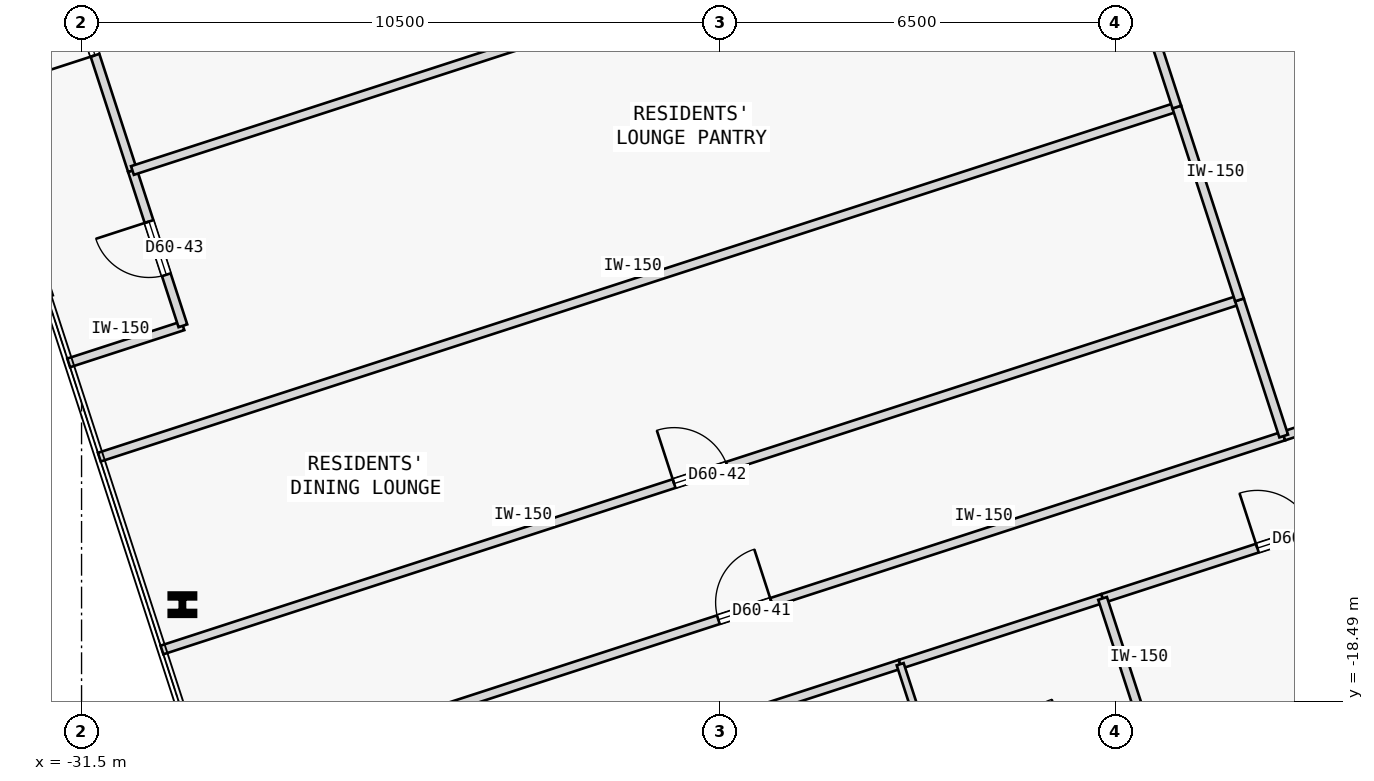
"""IFC4 building model, lengths in metres.
Left out: names, types, materials, properties, quantities, classifications, styles, units other than length and angle.
Written with IfcOpenShell. Run it as: python <this file> out.ifc"""

import sys

from ifc_helpers import new_model, si_unit, direction, frame, frame_2d, origin, origin_2d, place, context, subcontext, project, spatial, rectangle, i_section, extrude, element, fill, save


model = new_model("IFC4")
c1 = context("Model", 3, precision=1e-05, world=origin(), true_north=direction((0.0, 1.0)))
c2 = subcontext(c1, "Body", "Model", "MODEL_VIEW")
j1 = project(units=[si_unit("LENGTHUNIT", "METRE"), si_unit("PLANEANGLEUNIT", "RADIAN")], contexts=[c1])
p1 = place(None, origin())
s1 = spatial("IfcSite", under=j1, at=p1, CompositionType="ELEMENT")
p2 = place(p1, origin())
s2 = spatial("IfcBuilding", under=s1, at=p2, CompositionType="ELEMENT")
p3 = place(p2, frame((0.0, 0.0, 227.65)))
s3 = spatial("IfcBuildingStorey", under=s2, at=p3, CompositionType="ELEMENT", Elevation=227.65)
p4 = place(p3, frame((-29.842, -16.897, 0.0), z_axis=(0.0, 0.0, 1.0), x_axis=(1.0, 0.0, 0.0)))
e1 = element("IfcColumn", 1, at=p4, inside=s3, PredefinedType="COLUMN", context=c2, shape_type="SweptSolid", body=[
    extrude(i_section(OverallWidth=0.405, OverallDepth=0.355, WebThickness=0.042, FlangeThickness=0.068, FilletRadius=0.015, at=origin_2d()), origin(), (0.0, 0.0, 1.0), 3.35),
])
p5 = place(p3, frame((-14.709, -16.794, 0.0), z_axis=(0.0, 0.0, 1.0), x_axis=(0.951050295235, 0.309036140172, 0.0)))
e2 = element("IfcWall", 2, at=p5, inside=s3, PredefinedType="PARTITIONING", context=c2, shape_type="SweptSolid", body=[
    extrude(rectangle(XDim=6.302, YDim=0.15, at=frame_2d((3.151, 0.0))), origin(), (0.0, 0.0, 1.0), 3.125),
])
p6 = place(p5, frame((2.676, 0.0, 0.0)))
e3 = element("IfcOpeningElement", 3, at=p6, cuts=e2, PredefinedType="OPENING", context=c2, shape_type="SweptSolid", body=[
    extrude(rectangle(XDim=0.95, YDim=2.15, at=frame_2d((0.475, 1.075))), frame((0.0, 0.085, 0.0), z_axis=(0.0, -1.0, 0.0), x_axis=(1.0, 0.0, 0.0)), (0.0, 0.0, 1.0), 0.17),
])
p7 = place(p3, frame((-22.175, -19.22, 0.0), z_axis=(0.0, 0.0, 1.0), x_axis=(0.951052627573, 0.309028962374, 0.0)))
e4 = element("IfcWall", 4, at=p7, inside=s3, PredefinedType="PARTITIONING", context=c2, shape_type="SweptSolid", body=[
    extrude(rectangle(XDim=4.35, YDim=0.15, at=frame_2d((2.175, 0.0))), origin(), (0.0, 0.0, 1.0), 3.125),
])
p8 = place(p3, frame((-18.038, -17.876, 0.0), z_axis=(0.0, 0.0, 1.0), x_axis=(0.951062257173, 0.308999325213, 0.0)))
e5 = element("IfcWall", 5, at=p8, inside=s3, PredefinedType="PARTITIONING", context=c2, shape_type="SweptSolid", body=[
    extrude(rectangle(XDim=3.5, YDim=0.15, at=frame_2d((1.75, 0.0))), origin(), (0.0, 0.0, 1.0), 3.125),
])
p9 = place(p3, frame((-29.45, -19.881, 0.0), z_axis=(0.0, 0.0, 1.0), x_axis=(0.95105650271, 0.309017036186, 0.0)))
e6 = element("IfcWall", 6, at=p9, inside=s3, PredefinedType="PARTITIONING", context=c2, shape_type="SweptSolid", body=[
    extrude(rectangle(XDim=18.632, YDim=0.15, at=frame_2d((9.316, 0.0))), origin(), (0.0, 0.0, 1.0), 3.125),
])
p10 = place(p9, frame((8.856, 0.0, 0.0)))
e7 = element("IfcOpeningElement", 7, at=p10, cuts=e6, PredefinedType="OPENING", context=c2, shape_type="SweptSolid", body=[
    extrude(rectangle(XDim=0.92, YDim=2.15, at=frame_2d((0.46, 1.075))), frame((0.0, 0.085, 0.0), z_axis=(0.0, -1.0, 0.0), x_axis=(1.0, 0.0, 0.0)), (0.0, 0.0, 1.0), 0.17),
])
p11 = place(p3, frame((-31.712, -12.921, 0.0), z_axis=(0.0, 0.0, 1.0), x_axis=(0.951054051148, 0.309024581215, 0.0)))
e8 = element("IfcWall", 8, at=p11, inside=s3, PredefinedType="PARTITIONING", context=c2, shape_type="SweptSolid", body=[
    extrude(rectangle(XDim=1.975, YDim=0.15, at=frame_2d((0.988, 0.0))), origin(), (0.0, 0.0, 1.0), 3.125),
])
p12 = place(p3, frame((-29.833, -12.311, 0.0), z_axis=(0.0, 0.0, 1.0), x_axis=(-0.309044953986, 0.951047431213, 0.0)))
e9 = element("IfcWall", 9, at=p12, inside=s3, PredefinedType="PARTITIONING", context=c2, shape_type="SweptSolid", body=[
    extrude(rectangle(XDim=2.685, YDim=0.15, at=frame_2d((1.343, 0.0))), origin(), (0.0, 0.0, 1.0), 3.125),
])
p13 = place(p12, frame((0.883, 0.0, 0.0)))
e10 = element("IfcOpeningElement", 10, at=p13, cuts=e9, PredefinedType="OPENING", context=c2, shape_type="SweptSolid", body=[
    extrude(rectangle(XDim=0.92, YDim=2.15, at=frame_2d((0.46, 1.075))), frame((0.0, 0.085, 0.0), z_axis=(0.0, -1.0, 0.0), x_axis=(1.0, 0.0, 0.0)), (0.0, 0.0, 1.0), 0.17),
])
p14 = place(p3, frame((-30.663, -9.757, 0.0), z_axis=(0.0, 0.0, 1.0), x_axis=(-0.309019653166, 0.951055652397, 0.0)))
e11 = element("IfcWall", 11, at=p14, inside=s3, PredefinedType="PARTITIONING", context=c2, shape_type="SweptSolid", body=[
    extrude(rectangle(XDim=4.904, YDim=0.15, at=frame_2d((2.452, 0.0))), origin(), (0.0, 0.0, 1.0), 3.125),
])
p15 = place(p14, frame((1.992, 0.0, 0.0)))
e12 = element("IfcOpeningElement", 12, at=p15, cuts=e11, PredefinedType="OPENING", context=c2, shape_type="SweptSolid", body=[
    extrude(rectangle(XDim=0.92, YDim=2.15, at=frame_2d((0.46, 1.075))), frame((0.0, 0.085, 0.0), z_axis=(0.0, -1.0, 0.0), x_axis=(1.0, 0.0, 0.0)), (0.0, 0.0, 1.0), 0.17),
])
p16 = place(p3, frame((-11.73, -14.123, 0.0), z_axis=(0.0, 0.0, 1.0), x_axis=(0.951052502763, 0.309029346483, 0.0)))
e13 = element("IfcWall", 13, at=p16, inside=s3, PredefinedType="PARTITIONING", context=c2, shape_type="SweptSolid", body=[
    extrude(rectangle(XDim=3.698, YDim=0.15, at=frame_2d((1.849, 0.0))), origin(), (0.0, 0.0, 1.0), 3.125),
])
p17 = place(p16, frame((1.389, 0.0, 0.0)))
e14 = element("IfcOpeningElement", 14, at=p17, cuts=e13, PredefinedType="OPENING", context=c2, shape_type="SweptSolid", body=[
    extrude(rectangle(XDim=0.92, YDim=2.15, at=frame_2d((0.46, 1.075))), frame((0.0, 0.085, 0.0), z_axis=(0.0, -1.0, 0.0), x_axis=(1.0, 0.0, 0.0)), (0.0, 0.0, 1.0), 0.17),
])
p18 = place(p3, frame((-14.029, -18.886, 0.0), z_axis=(0.0, 0.0, 1.0), x_axis=(-0.308960600764, 0.951074837842, 0.0)))
e15 = element("IfcWall", 15, at=p18, inside=s3, PredefinedType="PARTITIONING", context=c2, shape_type="SweptSolid", body=[
    extrude(rectangle(XDim=2.2, YDim=0.15, at=frame_2d((1.1, 0.0))), origin(), (0.0, 0.0, 1.0), 3.125),
])
p19 = place(p3, frame((-12.12, -19.738, 0.0), z_axis=(0.0, 0.0, 1.0), x_axis=(0.951065702951, 0.308988719326, 0.0)))
e16 = element("IfcWall", 16, at=p19, inside=s3, PredefinedType="PARTITIONING", context=c2, shape_type="SweptSolid", body=[
    extrude(rectangle(XDim=4.65, YDim=0.15, at=frame_2d((2.325, 0.0))), origin(), (0.0, 0.0, 1.0), 3.125),
])
p20 = place(p19, frame((1.875, 0.0, 0.0)))
e17 = element("IfcOpeningElement", 17, at=p20, cuts=e16, PredefinedType="OPENING", context=c2, shape_type="SweptSolid", body=[
    extrude(rectangle(XDim=0.9, YDim=2.15, at=frame_2d((0.45, 1.075))), frame((0.0, 0.085, 0.0), z_axis=(0.0, -1.0, 0.0), x_axis=(1.0, 0.0, 0.0)), (0.0, 0.0, 1.0), 0.17),
])
p21 = place(p3, frame((-17.358, -19.968, 0.0), z_axis=(0.0, 0.0, 1.0), x_axis=(-0.309060979314, 0.951042223598, 0.0)))
e18 = element("IfcWall", 18, at=p21, inside=s3, PredefinedType="PARTITIONING", context=c2, shape_type="SweptSolid", body=[
    extrude(rectangle(XDim=2.2, YDim=0.12, at=frame_2d((1.1, 0.0))), origin(), (0.0, 0.0, 1.0), 3.125),
])
p22 = place(p3, frame((-30.178, -17.642, 0.0), z_axis=(0.0, 0.0, 1.0), x_axis=(0.95105650271, 0.309017036186, 0.0)))
e19 = element("IfcWall", 19, at=p22, inside=s3, PredefinedType="PARTITIONING", context=c2, shape_type="SweptSolid", body=[
    extrude(rectangle(XDim=18.632, YDim=0.15, at=frame_2d((9.316, 0.0))), origin(), (0.0, 0.0, 1.0), 3.125),
])
p23 = place(p22, frame((8.856, 0.0, 0.0)))
e20 = element("IfcOpeningElement", 20, at=p23, cuts=e19, PredefinedType="OPENING", context=c2, shape_type="SweptSolid", body=[
    extrude(rectangle(XDim=0.92, YDim=2.15, at=frame_2d((0.46, 1.075))), frame((0.0, 0.085, 0.0), z_axis=(0.0, -1.0, 0.0), x_axis=(1.0, 0.0, 0.0)), (0.0, 0.0, 1.0), 0.17),
])
p24 = place(p3, frame((-11.73, -14.123, 0.0), z_axis=(0.0, 0.0, 1.0), x_axis=(-0.309062621189, 0.951041690035, 0.0)))
e21 = element("IfcWall", 21, at=p24, inside=s3, PredefinedType="PARTITIONING", context=c2, shape_type="SweptSolid", body=[
    extrude(rectangle(XDim=2.354, YDim=0.15, at=frame_2d((1.177, 0.0))), origin(), (0.0, 0.0, 1.0), 3.125),
])
p25 = place(p3, frame((-31.208, -14.471, 0.0), z_axis=(0.0, 0.0, 1.0), x_axis=(0.951057753948, 0.309013185244, 0.0)))
e22 = element("IfcWall", 22, at=p25, inside=s3, PredefinedType="PARTITIONING", context=c2, shape_type="SweptSolid", body=[
    extrude(rectangle(XDim=18.632, YDim=0.15, at=frame_2d((9.316, 0.0))), origin(), (0.0, 0.0, 1.0), 3.125),
])
p26 = place(p3, frame((-12.458, -11.884, 0.0), z_axis=(0.0, 0.0, 1.0), x_axis=(-0.308946982245, 0.951079261766, 0.0)))
e23 = element("IfcWall", 23, at=p26, inside=s3, PredefinedType="PARTITIONING", context=c2, shape_type="SweptSolid", body=[
    extrude(rectangle(XDim=3.334, YDim=0.15, at=frame_2d((1.667, 0.0))), origin(), (0.0, 0.0, 1.0), 3.125),
])
p27 = place(p3, frame((-30.663, -9.757, 0.0), z_axis=(0.0, 0.0, 1.0), x_axis=(0.951058192995, 0.309011833974, 0.0)))
e24 = element("IfcWall", 24, at=p27, inside=s3, PredefinedType="PARTITIONING", context=c2, shape_type="SweptSolid", body=[
    extrude(rectangle(XDim=16.657, YDim=0.15, at=frame_2d((8.329, 0.0))), origin(), (0.0, 0.0, 1.0), 3.125),
])
p28 = place(p3, frame((-13.488, -8.713, 0.0), z_axis=(0.0, 0.0, 1.0), x_axis=(-0.309082700143, 0.951035164687, 0.0)))
e25 = element("IfcWall", 25, at=p28, inside=s3, PredefinedType="PARTITIONING", context=c2, shape_type="SweptSolid", body=[
    extrude(rectangle(XDim=3.274, YDim=0.15, at=frame_2d((1.637, 0.0))), origin(), (0.0, 0.0, 1.0), 3.125),
])
p29 = place(p6, origin())
e26 = element("IfcDoor", 26, at=p29, inside=s3, OperationType="SINGLE_SWING_LEFT", PredefinedType="DOOR", context=c2, shape_type="SweptSolid", body=[
    extrude(rectangle(XDim=0.95, YDim=2.15, at=frame_2d((0.475, 1.075))), frame((0.0, 0.025, 0.0), z_axis=(0.0, -1.0, 0.0), x_axis=(1.0, 0.0, 0.0)), (0.0, 0.0, 1.0), 0.05),
])
fill(e3, e26)
p30 = place(p10, origin())
e27 = element("IfcDoor", 27, at=p30, inside=s3, OperationType="SINGLE_SWING_RIGHT", PredefinedType="DOOR", context=c2, shape_type="SweptSolid", body=[
    extrude(rectangle(XDim=0.92, YDim=2.15, at=frame_2d((0.46, 1.075))), frame((0.0, 0.025, 0.0), z_axis=(0.0, -1.0, 0.0), x_axis=(1.0, 0.0, 0.0)), (0.0, 0.0, 1.0), 0.05),
])
fill(e7, e27)
p31 = place(p23, origin())
e28 = element("IfcDoor", 28, at=p31, inside=s3, OperationType="SINGLE_SWING_LEFT", PredefinedType="DOOR", context=c2, shape_type="SweptSolid", body=[
    extrude(rectangle(XDim=0.92, YDim=2.15, at=frame_2d((0.46, 1.075))), frame((0.0, 0.025, 0.0), z_axis=(0.0, -1.0, 0.0), x_axis=(1.0, 0.0, 0.0)), (0.0, 0.0, 1.0), 0.05),
])
fill(e20, e28)
p32 = place(p13, origin())
e29 = element("IfcDoor", 29, at=p32, inside=s3, OperationType="SINGLE_SWING_RIGHT", PredefinedType="DOOR", context=c2, shape_type="SweptSolid", body=[
    extrude(rectangle(XDim=0.92, YDim=2.15, at=frame_2d((0.46, 1.075))), frame((0.0, 0.025, 0.0), z_axis=(0.0, -1.0, 0.0), x_axis=(1.0, 0.0, 0.0)), (0.0, 0.0, 1.0), 0.05),
])
fill(e10, e29)
p33 = place(p15, origin())
e30 = element("IfcDoor", 30, at=p33, inside=s3, OperationType="SINGLE_SWING_LEFT", PredefinedType="DOOR", context=c2, shape_type="SweptSolid", body=[
    extrude(rectangle(XDim=0.92, YDim=2.15, at=frame_2d((0.46, 1.075))), frame((0.0, 0.025, 0.0), z_axis=(0.0, -1.0, 0.0), x_axis=(1.0, 0.0, 0.0)), (0.0, 0.0, 1.0), 0.05),
])
fill(e12, e30)
save(model, sys.argv[1])
